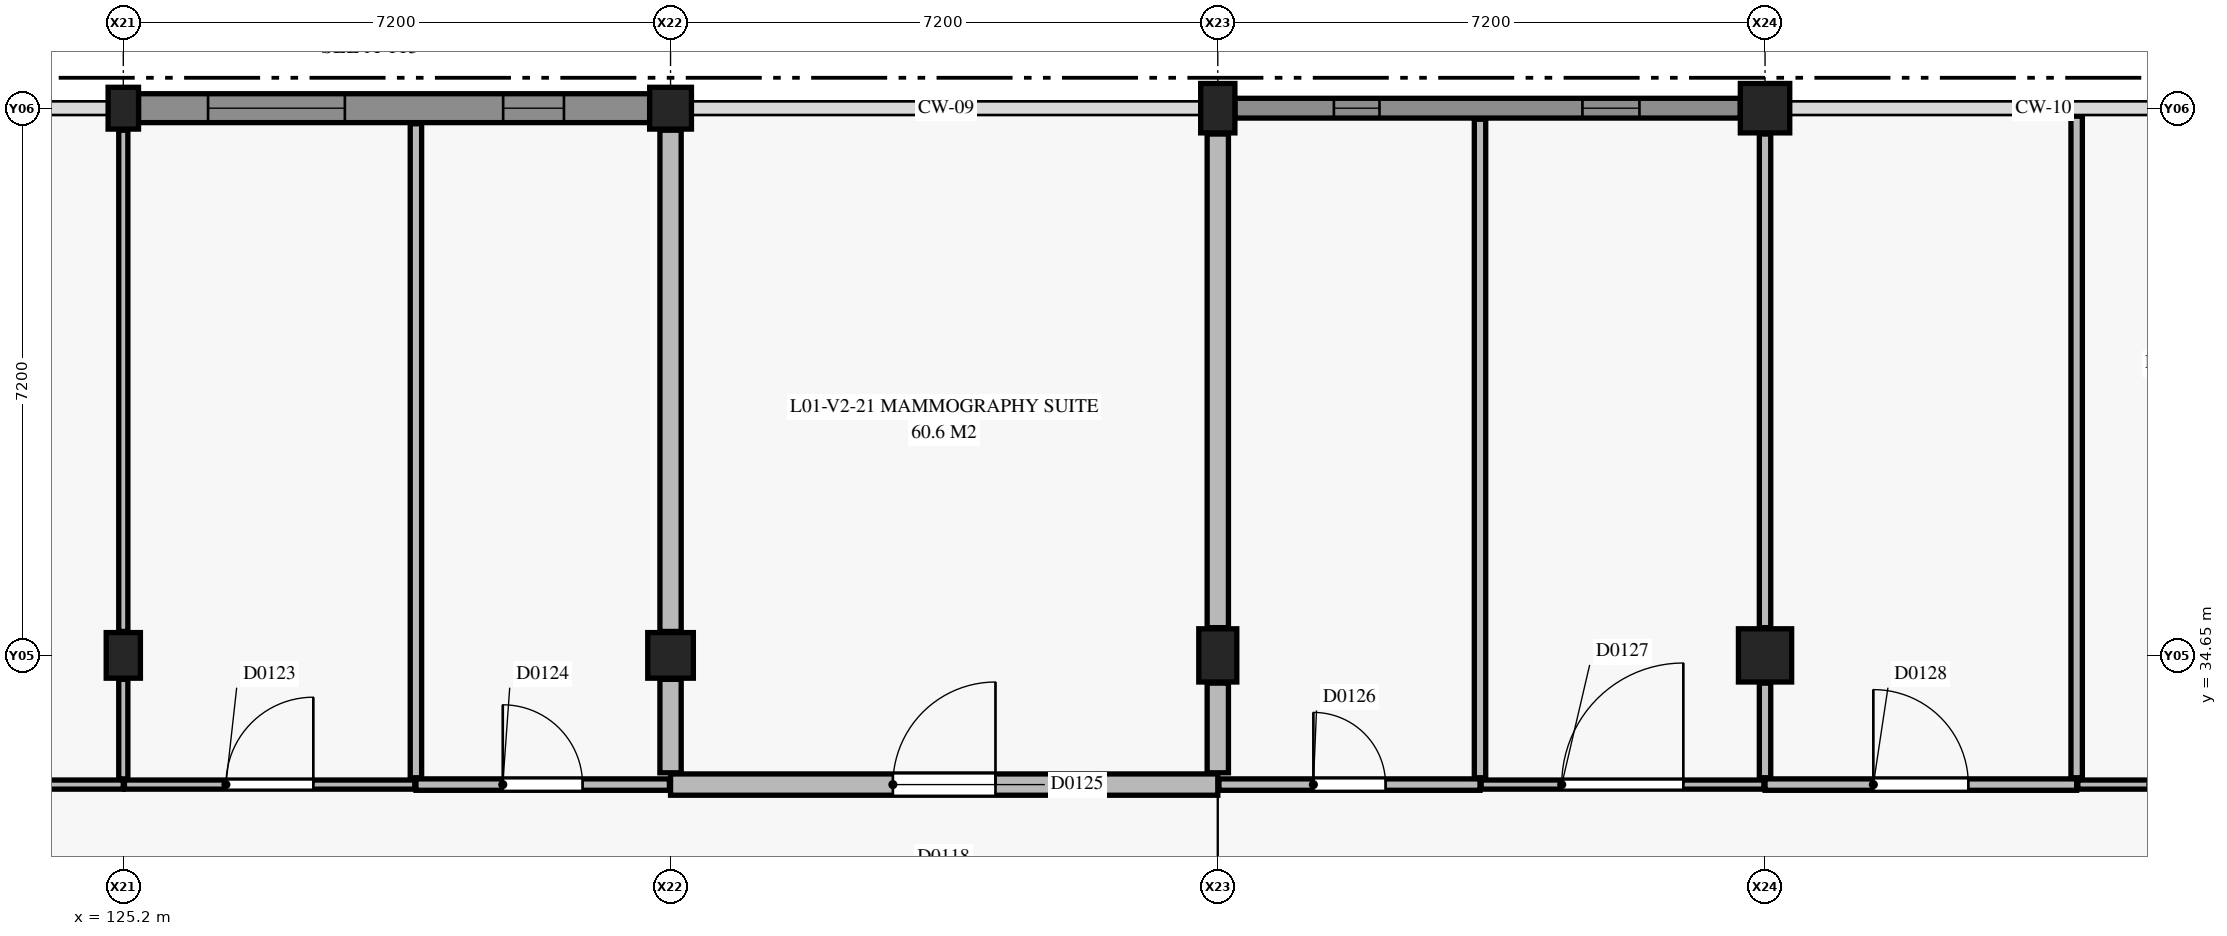
"""IFC4 building model, lengths in metres.
Left out: names, types, materials, properties, quantities, classifications, styles, units other than length and angle.
Written with IfcOpenShell. Run it as: python <this file> out.ifc"""

import sys

from ifc_helpers import new_model, si_unit, direction, frame, frame_2d, origin, origin_2d, place, context, subcontext, project, spatial, rectangle, extrude, element, fill, save


model = new_model("IFC4")
c1 = context("Model", 3, precision=1e-05, world=origin(), true_north=direction((0.0, 1.0)))
c2 = subcontext(c1, "Body", "Model", "MODEL_VIEW")
j1 = project(units=[si_unit("LENGTHUNIT", "METRE"), si_unit("PLANEANGLEUNIT", "RADIAN")], contexts=[c1])
p1 = place(None, origin())
s1 = spatial("IfcSite", under=j1, at=p1, CompositionType="ELEMENT")
p2 = place(p1, origin())
s2 = spatial("IfcBuilding", under=s1, at=p2, CompositionType="ELEMENT")
p3 = place(p2, frame((0.0, 0.0, 4.8)))
s3 = spatial("IfcBuildingStorey", under=s2, at=p3, CompositionType="ELEMENT", Elevation=4.8)
p4 = place(p3, frame((125.2, 34.65, 0.0), z_axis=(0.0, 0.0, 1.0), x_axis=(1.0, 0.0, 0.0)))
e1 = element("IfcColumn", 1, at=p4, inside=s3, PredefinedType="COLUMN", context=c2, shape_type="SweptSolid", body=[
    extrude(rectangle(XDim=0.45, YDim=0.6, at=origin_2d()), origin(), (0.0, 0.0, 1.0), 4.05),
])
p5 = place(p3, frame((125.2, 41.85, 0.0), z_axis=(0.0, 0.0, 1.0), x_axis=(1.0, 0.0, 0.0)))
e2 = element("IfcColumn", 2, at=p5, inside=s3, PredefinedType="COLUMN", context=c2, shape_type="SweptSolid", body=[
    extrude(rectangle(XDim=0.4, YDim=0.55, at=origin_2d()), origin(), (0.0, 0.0, 1.0), 4.36),
])
p6 = place(p3, frame((132.4, 34.65, 0.0), z_axis=(0.0, 0.0, 1.0), x_axis=(1.0, 0.0, 0.0)))
e3 = element("IfcColumn", 3, at=p6, inside=s3, PredefinedType="COLUMN", context=c2, shape_type="SweptSolid", body=[
    extrude(rectangle(XDim=0.6, YDim=0.6, at=origin_2d()), origin(), (0.0, 0.0, 1.0), 4.05),
])
p7 = place(p3, frame((132.4, 41.85, 0.0), z_axis=(0.0, 0.0, 1.0), x_axis=(1.0, 0.0, 0.0)))
e4 = element("IfcColumn", 4, at=p7, inside=s3, PredefinedType="COLUMN", context=c2, shape_type="SweptSolid", body=[
    extrude(rectangle(XDim=0.55, YDim=0.55, at=origin_2d()), origin(), (0.0, 0.0, 1.0), 4.36),
])
p8 = place(p3, frame((139.6, 34.65, 0.0), z_axis=(0.0, 0.0, 1.0), x_axis=(1.0, 0.0, 0.0)))
e5 = element("IfcColumn", 5, at=p8, inside=s3, PredefinedType="COLUMN", context=c2, shape_type="SweptSolid", body=[
    extrude(rectangle(XDim=0.5, YDim=0.7, at=origin_2d()), origin(), (0.0, 0.0, 1.0), 4.05),
])
p9 = place(p3, frame((139.6, 41.85, 0.0), z_axis=(0.0, 0.0, 1.0), x_axis=(1.0, 0.0, 0.0)))
e6 = element("IfcColumn", 6, at=p9, inside=s3, PredefinedType="COLUMN", context=c2, shape_type="SweptSolid", body=[
    extrude(rectangle(XDim=0.45, YDim=0.65, at=origin_2d()), origin(), (0.0, 0.0, 1.0), 4.36),
])
p10 = place(p3, frame((146.8, 34.65, 0.0), z_axis=(0.0, 0.0, 1.0), x_axis=(1.0, 0.0, 0.0)))
e7 = element("IfcColumn", 7, at=p10, inside=s3, PredefinedType="COLUMN", context=c2, shape_type="SweptSolid", body=[
    extrude(rectangle(XDim=0.7, YDim=0.7, at=origin_2d()), origin(), (0.0, 0.0, 1.0), 4.05),
])
p11 = place(p3, frame((146.8, 41.85, 0.0), z_axis=(0.0, 0.0, 1.0), x_axis=(1.0, 0.0, 0.0)))
e8 = element("IfcColumn", 8, at=p11, inside=s3, PredefinedType="COLUMN", context=c2, shape_type="SweptSolid", body=[
    extrude(rectangle(XDim=0.65, YDim=0.65, at=origin_2d()), origin(), (0.0, 0.0, 1.0), 4.36),
])
p12 = place(p3, frame((125.4, 41.85, 0.0), z_axis=(0.0, 0.0, 1.0), x_axis=(1.0, 0.0, 0.0)))
e9 = element("IfcWall", 9, at=p12, inside=s3, PredefinedType="USERDEFINED", context=c2, shape_type="SweptSolid", body=[
    extrude(rectangle(XDim=6.725, YDim=0.38, at=frame_2d((3.363, 0.0))), origin(), (0.0, 0.0, 1.0), 3.38),
])
p13 = place(p12, frame((0.915, 0.0, 0.9)))
e10 = element("IfcOpeningElement", 10, at=p13, cuts=e9, PredefinedType="OPENING", context=c2, shape_type="SweptSolid", body=[
    extrude(rectangle(XDim=1.8, YDim=0.9, at=frame_2d((0.9, 0.45))), frame((0.0, 0.2, 0.0), z_axis=(0.0, -1.0, 0.0), x_axis=(1.0, 0.0, 0.0)), (0.0, 0.0, 1.0), 0.4),
])
p14 = place(p12, frame((4.798, 0.0, 0.6)))
e11 = element("IfcOpeningElement", 11, at=p14, cuts=e9, PredefinedType="OPENING", context=c2, shape_type="SweptSolid", body=[
    extrude(rectangle(XDim=0.8, YDim=2.6, at=frame_2d((0.4, 1.3))), frame((0.0, 0.2, 0.0), z_axis=(0.0, -1.0, 0.0), x_axis=(1.0, 0.0, 0.0)), (0.0, 0.0, 1.0), 0.4),
])
p15 = place(p3, frame((139.825, 41.85, 0.0), z_axis=(0.0, 0.0, 1.0), x_axis=(1.0, 0.0, 0.0)))
e12 = element("IfcWall", 12, at=p15, inside=s3, PredefinedType="SOLIDWALL", context=c2, shape_type="SweptSolid", body=[
    extrude(rectangle(XDim=6.65, YDim=0.26, at=frame_2d((3.325, 0.0))), origin(), (0.0, 0.0, 1.0), 3.38),
])
p16 = place(p15, frame((1.302, 0.0, 0.9)))
e13 = element("IfcOpeningElement", 13, at=p16, cuts=e12, PredefinedType="OPENING", context=c2, shape_type="SweptSolid", body=[
    extrude(rectangle(XDim=0.6, YDim=1.8, at=frame_2d((0.3, 0.9))), frame((0.0, 0.14, 0.0), z_axis=(0.0, -1.0, 0.0), x_axis=(1.0, 0.0, 0.0)), (0.0, 0.0, 1.0), 0.28),
])
p17 = place(p15, frame((4.573, 0.0, 0.9)))
e14 = element("IfcOpeningElement", 14, at=p17, cuts=e12, PredefinedType="OPENING", context=c2, shape_type="SweptSolid", body=[
    extrude(rectangle(XDim=0.75, YDim=1.8, at=frame_2d((0.375, 0.9))), frame((0.0, 0.14, 0.0), z_axis=(0.0, -1.0, 0.0), x_axis=(1.0, 0.0, 0.0)), (0.0, 0.0, 1.0), 0.28),
])
p18 = place(p3, frame((132.4, 32.95, 0.0), z_axis=(0.0, 0.0, 1.0), x_axis=(1.0, 0.0, 0.0)))
e15 = element("IfcWall", 15, at=p18, inside=s3, PredefinedType="PARTITIONING", context=c2, shape_type="SweptSolid", body=[
    extrude(rectangle(XDim=7.2, YDim=0.28, at=frame_2d((3.6, 0.0))), origin(), (0.0, 0.0, 1.0), 3.95),
])
p19 = place(p18, frame((2.925, 0.0, 0.0)))
e16 = element("IfcOpeningElement", 16, at=p19, cuts=e15, PredefinedType="OPENING", context=c2, shape_type="SweptSolid", body=[
    extrude(rectangle(XDim=1.35, YDim=2.2, at=frame_2d((0.675, 1.1))), frame((0.0, 0.15, 0.0), z_axis=(0.0, -1.0, 0.0), x_axis=(1.0, 0.0, 0.0)), (0.0, 0.0, 1.0), 0.3),
])
p20 = place(p3, frame((129.05, 32.95, 0.0), z_axis=(0.0, 0.0, 1.0), x_axis=(1.0, 0.0, 0.0)))
e17 = element("IfcWall", 17, at=p20, inside=s3, PredefinedType="PARTITIONING", context=c2, shape_type="SweptSolid", body=[
    extrude(rectangle(XDim=3.335, YDim=0.15, at=frame_2d((1.667, 0.0))), origin(), (0.0, 0.0, 1.0), 3.95),
])
p21 = place(p20, frame((1.143, 0.0, 0.0)))
e18 = element("IfcOpeningElement", 18, at=p21, cuts=e17, PredefinedType="OPENING", context=c2, shape_type="SweptSolid", body=[
    extrude(rectangle(XDim=1.05, YDim=2.15, at=frame_2d((0.525, 1.075))), frame((0.0, 0.085, 0.0), z_axis=(0.0, -1.0, 0.0), x_axis=(1.0, 0.0, 0.0)), (0.0, 0.0, 1.0), 0.17),
])
p22 = place(p3, frame((139.615, 32.95, 0.0), z_axis=(0.0, 0.0, 1.0), x_axis=(1.0, 0.0, 0.0)))
e19 = element("IfcWall", 19, at=p22, inside=s3, PredefinedType="PARTITIONING", context=c2, shape_type="SweptSolid", body=[
    extrude(rectangle(XDim=3.435, YDim=0.15, at=frame_2d((1.718, 0.0))), origin(), (0.0, 0.0, 1.0), 3.95),
])
p23 = place(p22, frame((1.242, 0.0, 0.0)))
e20 = element("IfcOpeningElement", 20, at=p23, cuts=e19, PredefinedType="OPENING", context=c2, shape_type="SweptSolid", body=[
    extrude(rectangle(XDim=0.95, YDim=2.1, at=frame_2d((0.475, 1.05))), frame((0.0, 0.085, 0.0), z_axis=(0.0, -1.0, 0.0), x_axis=(1.0, 0.0, 0.0)), (0.0, 0.0, 1.0), 0.17),
])
p24 = place(p3, frame((146.8, 32.95, 0.0), z_axis=(0.0, 0.0, 1.0), x_axis=(1.0, 0.0, 0.0)))
e21 = element("IfcWall", 21, at=p24, inside=s3, PredefinedType="PARTITIONING", context=c2, shape_type="SweptSolid", body=[
    extrude(rectangle(XDim=4.1, YDim=0.15, at=frame_2d((2.05, 0.0))), origin(), (0.0, 0.0, 1.0), 3.95),
])
p25 = place(p24, frame((1.425, 0.0, 0.0)))
e22 = element("IfcOpeningElement", 22, at=p25, cuts=e21, PredefinedType="OPENING", context=c2, shape_type="SweptSolid", body=[
    extrude(rectangle(XDim=1.25, YDim=2.15, at=frame_2d((0.625, 1.075))), frame((0.0, 0.085, 0.0), z_axis=(0.0, -1.0, 0.0), x_axis=(1.0, 0.0, 0.0)), (0.0, 0.0, 1.0), 0.17),
])
p26 = place(p3, frame((121.6, 32.95, 0.0), z_axis=(0.0, 0.0, 1.0), x_axis=(1.0, 0.0, 0.0)))
e23 = element("IfcWall", 23, at=p26, inside=s3, PredefinedType="PARTITIONING", context=c2, shape_type="SweptSolid", body=[
    extrude(rectangle(XDim=3.6, YDim=0.12, at=frame_2d((1.8, 0.0))), origin(), (0.0, 0.0, 1.0), 3.95),
])
p27 = place(p26, frame((1.175, 0.0, 0.0)))
e24 = element("IfcOpeningElement", 24, at=p27, cuts=e23, PredefinedType="OPENING", context=c2, shape_type="SweptSolid", body=[
    extrude(rectangle(XDim=1.25, YDim=2.15, at=frame_2d((0.625, 1.075))), frame((0.0, 0.07, 0.0), z_axis=(0.0, -1.0, 0.0), x_axis=(1.0, 0.0, 0.0)), (0.0, 0.0, 1.0), 0.14),
])
p28 = place(p3, frame((125.215, 32.95, 0.0), z_axis=(0.0, 0.0, 1.0), x_axis=(1.0, 0.0, 0.0)))
e25 = element("IfcWall", 25, at=p28, inside=s3, PredefinedType="PARTITIONING", context=c2, shape_type="SweptSolid", body=[
    extrude(rectangle(XDim=3.82, YDim=0.12, at=frame_2d((1.91, 0.0))), origin(), (0.0, 0.0, 1.0), 3.95),
])
p29 = place(p28, frame((1.335, 0.0, 0.0)))
e26 = element("IfcOpeningElement", 26, at=p29, cuts=e25, PredefinedType="OPENING", context=c2, shape_type="SweptSolid", body=[
    extrude(rectangle(XDim=1.15, YDim=2.15, at=frame_2d((0.575, 1.075))), frame((0.0, 0.07, 0.0), z_axis=(0.0, -1.0, 0.0), x_axis=(1.0, 0.0, 0.0)), (0.0, 0.0, 1.0), 0.14),
])
p30 = place(p3, frame((143.065, 32.95, 0.0), z_axis=(0.0, 0.0, 1.0), x_axis=(1.0, 0.0, 0.0)))
e27 = element("IfcWall", 27, at=p30, inside=s3, PredefinedType="PARTITIONING", context=c2, shape_type="SweptSolid", body=[
    extrude(rectangle(XDim=3.72, YDim=0.12, at=frame_2d((1.86, 0.0))), origin(), (0.0, 0.0, 1.0), 3.95),
])
p31 = place(p30, frame((1.06, 0.0, 0.0)))
e28 = element("IfcOpeningElement", 28, at=p31, cuts=e27, PredefinedType="OPENING", context=c2, shape_type="SweptSolid", body=[
    extrude(rectangle(XDim=1.6, YDim=2.25, at=frame_2d((0.8, 1.125))), frame((0.0, 0.07, 0.0), z_axis=(0.0, -1.0, 0.0), x_axis=(1.0, 0.0, 0.0)), (0.0, 0.0, 1.0), 0.14),
])
p32 = place(p3, frame((150.915, 32.95, 0.0), z_axis=(0.0, 0.0, 1.0), x_axis=(1.0, 0.0, 0.0)))
e29 = element("IfcWall", 29, at=p32, inside=s3, PredefinedType="PARTITIONING", context=c2, shape_type="SweptSolid", body=[
    extrude(rectangle(XDim=3.07, YDim=0.12, at=frame_2d((1.535, 0.0))), origin(), (0.0, 0.0, 1.0), 3.95),
])
p33 = place(p32, frame((0.96, 0.0, 0.0)))
e30 = element("IfcOpeningElement", 30, at=p33, cuts=e29, PredefinedType="OPENING", context=c2, shape_type="SweptSolid", body=[
    extrude(rectangle(XDim=1.15, YDim=2.15, at=frame_2d((0.575, 1.075))), frame((0.0, 0.07, 0.0), z_axis=(0.0, -1.0, 0.0), x_axis=(1.0, 0.0, 0.0)), (0.0, 0.0, 1.0), 0.14),
])
p34 = place(p3, frame((132.4, 33.105, 0.0), z_axis=(0.0, 0.0, 1.0), x_axis=(0.0, 1.0, 0.0)))
e31 = element("IfcWall", 31, at=p34, inside=s3, PredefinedType="PARTITIONING", context=c2, shape_type="SweptSolid", body=[
    extrude(rectangle(XDim=1.23, YDim=0.28, at=frame_2d((0.615, 0.0))), origin(), (0.0, 0.0, 1.0), 3.95),
])
p35 = place(p3, frame((132.4, 34.965, 0.0), z_axis=(0.0, 0.0, 1.0), x_axis=(0.0, 1.0, 0.0)))
e32 = element("IfcWall", 32, at=p35, inside=s3, PredefinedType="PARTITIONING", context=c2, shape_type="SweptSolid", body=[
    extrude(rectangle(XDim=6.595, YDim=0.28, at=frame_2d((3.297, 0.0))), origin(), (0.0, 0.0, 1.0), 3.95),
])
p36 = place(p3, frame((139.6, 33.105, 0.0), z_axis=(0.0, 0.0, 1.0), x_axis=(0.0, 1.0, 0.0)))
e33 = element("IfcWall", 33, at=p36, inside=s3, PredefinedType="PARTITIONING", context=c2, shape_type="SweptSolid", body=[
    extrude(rectangle(XDim=1.18, YDim=0.28, at=frame_2d((0.59, 0.0))), origin(), (0.0, 0.0, 1.0), 3.95),
])
p37 = place(p3, frame((139.6, 35.015, 0.0), z_axis=(0.0, 0.0, 1.0), x_axis=(0.0, 1.0, 0.0)))
e34 = element("IfcWall", 34, at=p37, inside=s3, PredefinedType="PARTITIONING", context=c2, shape_type="SweptSolid", body=[
    extrude(rectangle(XDim=6.495, YDim=0.28, at=frame_2d((3.248, 0.0))), origin(), (0.0, 0.0, 1.0), 3.95),
])
p38 = place(p3, frame((129.05, 33.04, 0.0), z_axis=(0.0, 0.0, 1.0), x_axis=(0.0, 1.0, 0.0)))
e35 = element("IfcWall", 35, at=p38, inside=s3, PredefinedType="PARTITIONING", context=c2, shape_type="SweptSolid", body=[
    extrude(rectangle(XDim=8.605, YDim=0.15, at=frame_2d((4.302, 0.0))), origin(), (0.0, 0.0, 1.0), 3.22),
])
p39 = place(p3, frame((143.05, 33.04, 0.0), z_axis=(0.0, 0.0, 1.0), x_axis=(0.0, 1.0, 0.0)))
e36 = element("IfcWall", 36, at=p39, inside=s3, PredefinedType="PARTITIONING", context=c2, shape_type="SweptSolid", body=[
    extrude(rectangle(XDim=8.665, YDim=0.15, at=frame_2d((4.333, 0.0))), origin(), (0.0, 0.0, 1.0), 3.44),
])
p40 = place(p3, frame((146.8, 33.04, 0.0), z_axis=(0.0, 0.0, 1.0), x_axis=(0.0, 1.0, 0.0)))
e37 = element("IfcWall", 37, at=p40, inside=s3, PredefinedType="PARTITIONING", context=c2, shape_type="SweptSolid", body=[
    extrude(rectangle(XDim=1.245, YDim=0.15, at=frame_2d((0.623, 0.0))), origin(), (0.0, 0.0, 1.0), 3.95),
])
p41 = place(p3, frame((146.8, 35.015, 0.0), z_axis=(0.0, 0.0, 1.0), x_axis=(0.0, 1.0, 0.0)))
e38 = element("IfcWall", 38, at=p41, inside=s3, PredefinedType="PARTITIONING", context=c2, shape_type="SweptSolid", body=[
    extrude(rectangle(XDim=6.495, YDim=0.15, at=frame_2d((3.248, 0.0))), origin(), (0.0, 0.0, 1.0), 3.95),
])
p42 = place(p3, frame((150.9, 33.04, 0.0), z_axis=(0.0, 0.0, 1.0), x_axis=(0.0, 1.0, 0.0)))
e39 = element("IfcWall", 39, at=p42, inside=s3, PredefinedType="PARTITIONING", context=c2, shape_type="SweptSolid", body=[
    extrude(rectangle(XDim=8.705, YDim=0.15, at=frame_2d((4.353, 0.0))), origin(), (0.0, 0.0, 1.0), 3.44),
])
p43 = place(p3, frame((125.2, 33.025, 0.0), z_axis=(0.0, 0.0, 1.0), x_axis=(0.0, 1.0, 0.0)))
e40 = element("IfcWall", 40, at=p43, inside=s3, PredefinedType="PARTITIONING", context=c2, shape_type="SweptSolid", body=[
    extrude(rectangle(XDim=1.31, YDim=0.12, at=frame_2d((0.655, 0.0))), origin(), (0.0, 0.0, 1.0), 3.95),
])
p44 = place(p3, frame((125.2, 34.965, 0.0), z_axis=(0.0, 0.0, 1.0), x_axis=(0.0, 1.0, 0.0)))
e41 = element("IfcWall", 41, at=p44, inside=s3, PredefinedType="PARTITIONING", context=c2, shape_type="SweptSolid", body=[
    extrude(rectangle(XDim=6.595, YDim=0.12, at=frame_2d((3.297, 0.0))), origin(), (0.0, 0.0, 1.0), 3.95),
])
p45 = place(p13, origin())
e42 = element("IfcWindow", 42, at=p45, inside=s3, PartitioningType="SINGLE_PANEL", PredefinedType="WINDOW", context=c2, shape_type="SweptSolid", body=[
    extrude(rectangle(XDim=1.8, YDim=0.9, at=frame_2d((0.9, 0.45))), frame((0.0, 0.03, 0.0), z_axis=(0.0, -1.0, 0.0), x_axis=(1.0, 0.0, 0.0)), (0.0, 0.0, 1.0), 0.06),
])
fill(e10, e42)
p46 = place(p14, origin())
e43 = element("IfcWindow", 43, at=p46, inside=s3, PartitioningType="SINGLE_PANEL", PredefinedType="WINDOW", context=c2, shape_type="SweptSolid", body=[
    extrude(rectangle(XDim=0.8, YDim=2.6, at=frame_2d((0.4, 1.3))), frame((0.0, 0.03, 0.0), z_axis=(0.0, -1.0, 0.0), x_axis=(1.0, 0.0, 0.0)), (0.0, 0.0, 1.0), 0.06),
])
fill(e11, e43)
p47 = place(p16, origin())
e44 = element("IfcWindow", 44, at=p47, inside=s3, PartitioningType="SINGLE_PANEL", PredefinedType="WINDOW", context=c2, shape_type="SweptSolid", body=[
    extrude(rectangle(XDim=0.6, YDim=1.8, at=frame_2d((0.3, 0.9))), frame((0.0, 0.03, 0.0), z_axis=(0.0, -1.0, 0.0), x_axis=(1.0, 0.0, 0.0)), (0.0, 0.0, 1.0), 0.06),
])
fill(e13, e44)
p48 = place(p17, origin())
e45 = element("IfcWindow", 45, at=p48, inside=s3, PartitioningType="SINGLE_PANEL", PredefinedType="WINDOW", context=c2, shape_type="SweptSolid", body=[
    extrude(rectangle(XDim=0.75, YDim=1.8, at=frame_2d((0.375, 0.9))), frame((0.0, 0.03, 0.0), z_axis=(0.0, -1.0, 0.0), x_axis=(1.0, 0.0, 0.0)), (0.0, 0.0, 1.0), 0.06),
])
fill(e14, e45)
p49 = place(p29, origin())
e46 = element("IfcDoor", 46, at=p49, inside=s3, OperationType="SINGLE_SWING_RIGHT", PredefinedType="DOOR", context=c2, shape_type="SweptSolid", body=[
    extrude(rectangle(XDim=1.15, YDim=2.15, at=frame_2d((0.575, 1.075))), frame((0.0, 0.025, 0.0), z_axis=(0.0, -1.0, 0.0), x_axis=(1.0, 0.0, 0.0)), (0.0, 0.0, 1.0), 0.05),
])
fill(e26, e46)
p50 = place(p21, origin())
e47 = element("IfcDoor", 47, at=p50, inside=s3, OperationType="SINGLE_SWING_LEFT", PredefinedType="DOOR", context=c2, shape_type="SweptSolid", body=[
    extrude(rectangle(XDim=1.05, YDim=2.15, at=frame_2d((0.525, 1.075))), frame((0.0, 0.025, 0.0), z_axis=(0.0, -1.0, 0.0), x_axis=(1.0, 0.0, 0.0)), (0.0, 0.0, 1.0), 0.05),
])
fill(e18, e47)
p51 = place(p19, origin())
e48 = element("IfcDoor", 48, at=p51, inside=s3, OperationType="SINGLE_SWING_RIGHT", PredefinedType="DOOR", context=c2, shape_type="SweptSolid", body=[
    extrude(rectangle(XDim=1.35, YDim=2.2, at=frame_2d((0.675, 1.1))), frame((0.0, 0.025, 0.0), z_axis=(0.0, -1.0, 0.0), x_axis=(1.0, 0.0, 0.0)), (0.0, 0.0, 1.0), 0.05),
])
fill(e16, e48)
p52 = place(p23, origin())
e49 = element("IfcDoor", 49, at=p52, inside=s3, OperationType="SINGLE_SWING_LEFT", PredefinedType="DOOR", context=c2, shape_type="SweptSolid", body=[
    extrude(rectangle(XDim=0.95, YDim=2.1, at=frame_2d((0.475, 1.05))), frame((0.0, 0.025, 0.0), z_axis=(0.0, -1.0, 0.0), x_axis=(1.0, 0.0, 0.0)), (0.0, 0.0, 1.0), 0.05),
])
fill(e20, e49)
p53 = place(p31, origin())
e50 = element("IfcDoor", 50, at=p53, inside=s3, OperationType="SINGLE_SWING_RIGHT", PredefinedType="DOOR", context=c2, shape_type="SweptSolid", body=[
    extrude(rectangle(XDim=1.6, YDim=2.25, at=frame_2d((0.8, 1.125))), frame((0.0, 0.025, 0.0), z_axis=(0.0, -1.0, 0.0), x_axis=(1.0, 0.0, 0.0)), (0.0, 0.0, 1.0), 0.05),
])
fill(e28, e50)
p54 = place(p25, origin())
e51 = element("IfcDoor", 51, at=p54, inside=s3, OperationType="SINGLE_SWING_LEFT", PredefinedType="DOOR", context=c2, shape_type="SweptSolid", body=[
    extrude(rectangle(XDim=1.25, YDim=2.15, at=frame_2d((0.625, 1.075))), frame((0.0, 0.025, 0.0), z_axis=(0.0, -1.0, 0.0), x_axis=(1.0, 0.0, 0.0)), (0.0, 0.0, 1.0), 0.05),
])
fill(e22, e51)
save(model, sys.argv[1])
